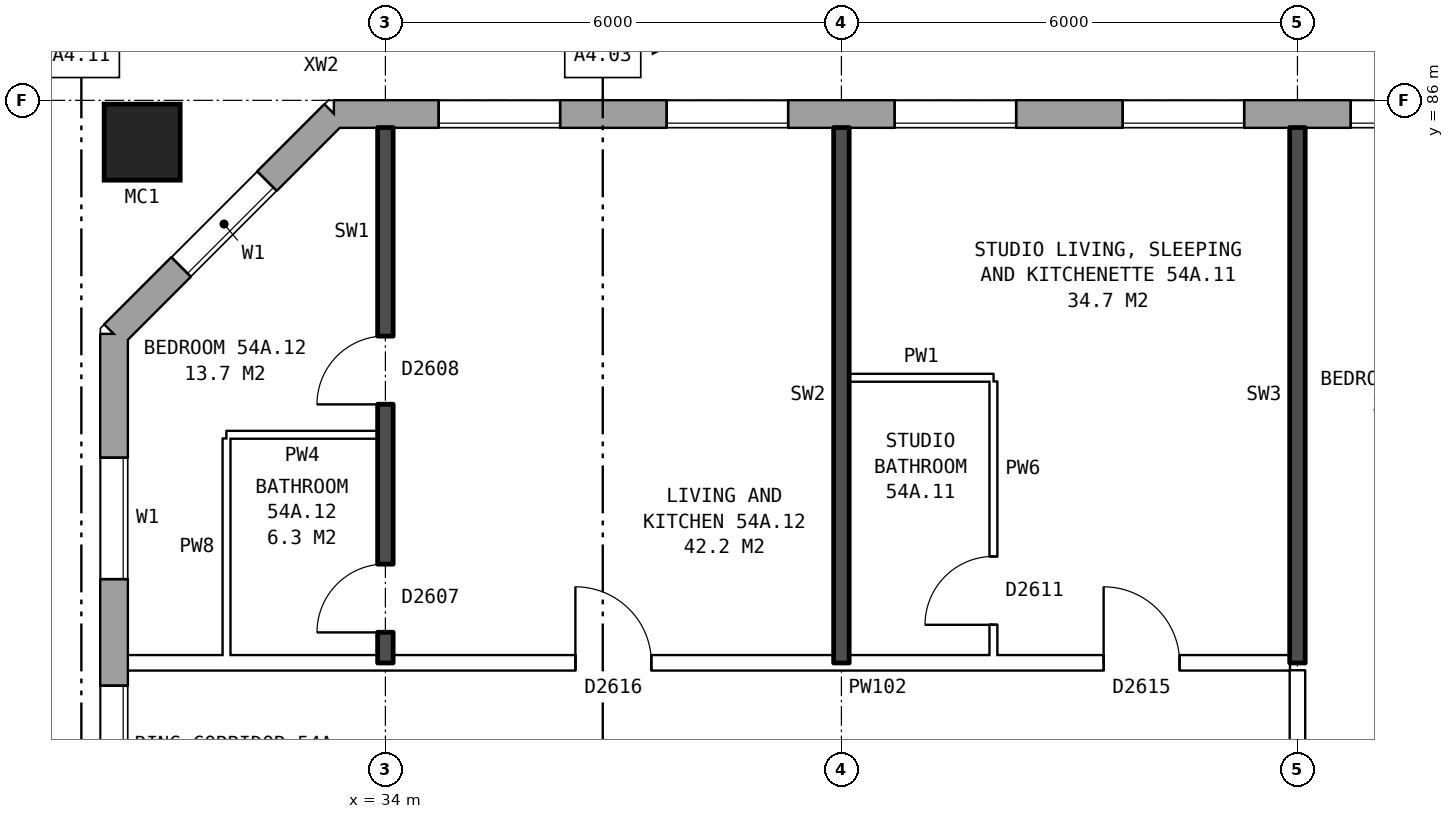
"""IFC4 building model, lengths in metres.
Left out: names, types, materials, properties, quantities, classifications, styles, units other than length and angle.
Written with IfcOpenShell. Run it as: python <this file> out.ifc"""

import sys

from ifc_helpers import new_model, si_unit, direction, frame, frame_2d, origin, origin_2d, place, context, subcontext, project, spatial, rectangle, hollow_rectangle, extrude, element, fill, save


model = new_model("IFC4")
c1 = context("Model", 3, precision=1e-05, world=origin(), true_north=direction((0.0, 1.0)))
c2 = subcontext(c1, "Body", "Model", "MODEL_VIEW")
j1 = project(units=[si_unit("LENGTHUNIT", "METRE"), si_unit("PLANEANGLEUNIT", "RADIAN")], contexts=[c1])
p1 = place(None, origin())
s1 = spatial("IfcSite", under=j1, at=p1, CompositionType="ELEMENT")
p2 = place(p1, origin())
s2 = spatial("IfcBuilding", under=s1, at=p2, CompositionType="ELEMENT")
p3 = place(p2, frame((0.0, 0.0, 191.3)))
s3 = spatial("IfcBuildingStorey", under=s2, at=p3, CompositionType="ELEMENT", Elevation=191.3)
p4 = place(p3, frame((30.8, 85.45, 0.0), z_axis=(0.0, 0.0, 1.0), x_axis=(1.0, 0.0, 0.0)))
e1 = element("IfcColumn", 1, at=p4, inside=s3, PredefinedType="COLUMN", context=c2, shape_type="SweptSolid", body=[
    extrude(hollow_rectangle(XDim=1.0, YDim=1.0, WallThickness=0.055, at=origin_2d()), origin(), (0.0, 0.0, 1.0), 3.1),
])
p5 = place(p3, frame((72.925, 85.82, 0.0), z_axis=(0.0, 0.0, 1.0), x_axis=(-1.0, 0.0, 0.0)))
e2 = element("IfcWall", 2, at=p5, inside=s3, PredefinedType="STANDARD", context=c2, shape_type="SweptSolid", body=[
    extrude(rectangle(XDim=39.601, YDim=0.36, at=frame_2d((19.8, 0.0))), origin(), (0.0, 0.0, 1.0), 2.85),
])
p6 = place(p5, frame((0.625, 0.0, 0.8)))
e3 = element("IfcOpeningElement", 3, at=p6, cuts=e2, PredefinedType="OPENING", context=c2, shape_type="SweptSolid", body=[
    extrude(rectangle(XDim=1.6, YDim=1.8, at=frame_2d((0.8, 0.9))), frame((0.0, 0.19, 0.0), z_axis=(0.0, -1.0, 0.0), x_axis=(1.0, 0.0, 0.0)), (0.0, 0.0, 1.0), 0.38),
])
p7 = place(p5, frame((3.625, 0.0, 0.8)))
e4 = element("IfcOpeningElement", 4, at=p7, cuts=e2, PredefinedType="OPENING", context=c2, shape_type="SweptSolid", body=[
    extrude(rectangle(XDim=1.6, YDim=1.8, at=frame_2d((0.8, 0.9))), frame((0.0, 0.19, 0.0), z_axis=(0.0, -1.0, 0.0), x_axis=(1.0, 0.0, 0.0)), (0.0, 0.0, 1.0), 0.38),
])
p8 = place(p5, frame((6.625, 0.0, 0.8)))
e5 = element("IfcOpeningElement", 5, at=p8, cuts=e2, PredefinedType="OPENING", context=c2, shape_type="SweptSolid", body=[
    extrude(rectangle(XDim=1.6, YDim=1.8, at=frame_2d((0.8, 0.9))), frame((0.0, 0.19, 0.0), z_axis=(0.0, -1.0, 0.0), x_axis=(1.0, 0.0, 0.0)), (0.0, 0.0, 1.0), 0.38),
])
p9 = place(p5, frame((9.625, 0.0, 0.8)))
e6 = element("IfcOpeningElement", 6, at=p9, cuts=e2, PredefinedType="OPENING", context=c2, shape_type="SweptSolid", body=[
    extrude(rectangle(XDim=1.6, YDim=1.8, at=frame_2d((0.8, 0.9))), frame((0.0, 0.19, 0.0), z_axis=(0.0, -1.0, 0.0), x_axis=(1.0, 0.0, 0.0)), (0.0, 0.0, 1.0), 0.38),
])
p10 = place(p5, frame((12.625, 0.0, 0.8)))
e7 = element("IfcOpeningElement", 7, at=p10, cuts=e2, PredefinedType="OPENING", context=c2, shape_type="SweptSolid", body=[
    extrude(rectangle(XDim=1.6, YDim=1.8, at=frame_2d((0.8, 0.9))), frame((0.0, 0.19, 0.0), z_axis=(0.0, -1.0, 0.0), x_axis=(1.0, 0.0, 0.0)), (0.0, 0.0, 1.0), 0.38),
])
p11 = place(p5, frame((15.625, 0.0, 0.8)))
e8 = element("IfcOpeningElement", 8, at=p11, cuts=e2, PredefinedType="OPENING", context=c2, shape_type="SweptSolid", body=[
    extrude(rectangle(XDim=1.6, YDim=1.8, at=frame_2d((0.8, 0.9))), frame((0.0, 0.19, 0.0), z_axis=(0.0, -1.0, 0.0), x_axis=(1.0, 0.0, 0.0)), (0.0, 0.0, 1.0), 0.38),
])
p12 = place(p5, frame((18.975, 0.0, 0.15)))
e9 = element("IfcOpeningElement", 9, at=p12, cuts=e2, PredefinedType="OPENING", context=c2, shape_type="SweptSolid", body=[
    extrude(rectangle(XDim=1.6, YDim=1.2, at=frame_2d((0.8, 0.6))), frame((0.0, 0.19, 0.0), z_axis=(0.0, -1.0, 0.0), x_axis=(1.0, 0.0, 0.0)), (0.0, 0.0, 1.0), 0.38),
])
p13 = place(p5, frame((21.375, 0.0, 1.7)))
e10 = element("IfcOpeningElement", 10, at=p13, cuts=e2, PredefinedType="OPENING", context=c2, shape_type="SweptSolid", body=[
    extrude(rectangle(XDim=0.6, YDim=0.9, at=frame_2d((0.3, 0.45))), frame((0.0, 0.19, 0.0), z_axis=(0.0, -1.0, 0.0), x_axis=(1.0, 0.0, 0.0)), (0.0, 0.0, 1.0), 0.38),
])
p14 = place(p5, frame((24.625, 0.0, 0.8)))
e11 = element("IfcOpeningElement", 11, at=p14, cuts=e2, PredefinedType="OPENING", context=c2, shape_type="SweptSolid", body=[
    extrude(rectangle(XDim=1.6, YDim=1.8, at=frame_2d((0.8, 0.9))), frame((0.0, 0.19, 0.0), z_axis=(0.0, -1.0, 0.0), x_axis=(1.0, 0.0, 0.0)), (0.0, 0.0, 1.0), 0.38),
])
p15 = place(p5, frame((27.625, 0.0, 0.8)))
e12 = element("IfcOpeningElement", 12, at=p15, cuts=e2, PredefinedType="OPENING", context=c2, shape_type="SweptSolid", body=[
    extrude(rectangle(XDim=1.6, YDim=1.8, at=frame_2d((0.8, 0.9))), frame((0.0, 0.19, 0.0), z_axis=(0.0, -1.0, 0.0), x_axis=(1.0, 0.0, 0.0)), (0.0, 0.0, 1.0), 0.38),
])
p16 = place(p5, frame((30.625, 0.0, 0.8)))
e13 = element("IfcOpeningElement", 13, at=p16, cuts=e2, PredefinedType="OPENING", context=c2, shape_type="SweptSolid", body=[
    extrude(rectangle(XDim=1.6, YDim=1.8, at=frame_2d((0.8, 0.9))), frame((0.0, 0.19, 0.0), z_axis=(0.0, -1.0, 0.0), x_axis=(1.0, 0.0, 0.0)), (0.0, 0.0, 1.0), 0.38),
])
p17 = place(p5, frame((33.625, 0.0, 0.8)))
e14 = element("IfcOpeningElement", 14, at=p17, cuts=e2, PredefinedType="OPENING", context=c2, shape_type="SweptSolid", body=[
    extrude(rectangle(XDim=1.6, YDim=1.8, at=frame_2d((0.8, 0.9))), frame((0.0, 0.19, 0.0), z_axis=(0.0, -1.0, 0.0), x_axis=(1.0, 0.0, 0.0)), (0.0, 0.0, 1.0), 0.38),
])
p18 = place(p5, frame((36.625, 0.0, 0.8)))
e15 = element("IfcOpeningElement", 15, at=p18, cuts=e2, PredefinedType="OPENING", context=c2, shape_type="SweptSolid", body=[
    extrude(rectangle(XDim=1.6, YDim=1.8, at=frame_2d((0.8, 0.9))), frame((0.0, 0.19, 0.0), z_axis=(0.0, -1.0, 0.0), x_axis=(1.0, 0.0, 0.0)), (0.0, 0.0, 1.0), 0.38),
])
p19 = place(p5, frame((22.275, 0.0, 0.8)))
e16 = element("IfcOpeningElement", 16, at=p19, cuts=e2, PredefinedType="OPENING", context=c2, shape_type="SweptSolid", body=[
    extrude(rectangle(XDim=1.4, YDim=1.8, at=frame_2d((0.7, 0.9))), frame((0.0, 0.19, 0.0), z_axis=(0.0, -1.0, 0.0), x_axis=(1.0, 0.0, 0.0)), (0.0, 0.0, 1.0), 0.38),
])
p20 = place(p3, frame((33.325, 85.82, 0.0), z_axis=(0.0, 0.0, 1.0), x_axis=(-0.707106781187, -0.707106781187, 0.0)))
e17 = element("IfcWall", 17, at=p20, inside=s3, PredefinedType="STANDARD", context=c2, shape_type="SweptSolid", body=[
    extrude(rectangle(XDim=4.094, YDim=0.36, at=frame_2d((2.047, 0.0))), origin(), (0.0, 0.0, 1.0), 2.85),
])
p21 = place(p20, frame((1.247, 0.0, 0.8)))
e18 = element("IfcOpeningElement", 18, at=p21, cuts=e17, PredefinedType="OPENING", context=c2, shape_type="SweptSolid", body=[
    extrude(rectangle(XDim=1.6, YDim=1.8, at=frame_2d((0.8, 0.9))), frame((0.0, 0.19, 0.0), z_axis=(0.0, -1.0, 0.0), x_axis=(1.0, 0.0, 0.0)), (0.0, 0.0, 1.0), 0.38),
])
p22 = place(p3, frame((30.43, 82.925, 0.0), z_axis=(0.0, 0.0, 1.0), x_axis=(0.0, -1.0, 0.0)))
e19 = element("IfcWall", 19, at=p22, inside=s3, PredefinedType="STANDARD", context=c2, shape_type="SweptSolid", body=[
    extrude(rectangle(XDim=25.851, YDim=0.36, at=frame_2d((12.925, 0.0))), origin(), (0.0, 0.0, 1.0), 2.85),
])
p23 = place(p22, frame((1.625, 0.0, 0.8)))
e20 = element("IfcOpeningElement", 20, at=p23, cuts=e19, PredefinedType="OPENING", context=c2, shape_type="SweptSolid", body=[
    extrude(rectangle(XDim=1.6, YDim=1.8, at=frame_2d((0.8, 0.9))), frame((0.0, 0.19, 0.0), z_axis=(0.0, -1.0, 0.0), x_axis=(1.0, 0.0, 0.0)), (0.0, 0.0, 1.0), 0.38),
])
p24 = place(p22, frame((4.625, 0.0, 0.8)))
e21 = element("IfcOpeningElement", 21, at=p24, cuts=e19, PredefinedType="OPENING", context=c2, shape_type="SweptSolid", body=[
    extrude(rectangle(XDim=1.6, YDim=1.8, at=frame_2d((0.8, 0.9))), frame((0.0, 0.19, 0.0), z_axis=(0.0, -1.0, 0.0), x_axis=(1.0, 0.0, 0.0)), (0.0, 0.0, 1.0), 0.38),
])
p25 = place(p22, frame((7.625, 0.0, 0.8)))
e22 = element("IfcOpeningElement", 22, at=p25, cuts=e19, PredefinedType="OPENING", context=c2, shape_type="SweptSolid", body=[
    extrude(rectangle(XDim=1.6, YDim=1.8, at=frame_2d((0.8, 0.9))), frame((0.0, 0.19, 0.0), z_axis=(0.0, -1.0, 0.0), x_axis=(1.0, 0.0, 0.0)), (0.0, 0.0, 1.0), 0.38),
])
p26 = place(p22, frame((10.625, 0.0, 0.8)))
e23 = element("IfcOpeningElement", 23, at=p26, cuts=e19, PredefinedType="OPENING", context=c2, shape_type="SweptSolid", body=[
    extrude(rectangle(XDim=1.6, YDim=1.8, at=frame_2d((0.8, 0.9))), frame((0.0, 0.19, 0.0), z_axis=(0.0, -1.0, 0.0), x_axis=(1.0, 0.0, 0.0)), (0.0, 0.0, 1.0), 0.38),
])
p27 = place(p22, frame((13.625, 0.0, 0.8)))
e24 = element("IfcOpeningElement", 24, at=p27, cuts=e19, PredefinedType="OPENING", context=c2, shape_type="SweptSolid", body=[
    extrude(rectangle(XDim=1.6, YDim=1.8, at=frame_2d((0.8, 0.9))), frame((0.0, 0.19, 0.0), z_axis=(0.0, -1.0, 0.0), x_axis=(1.0, 0.0, 0.0)), (0.0, 0.0, 1.0), 0.38),
])
p28 = place(p22, frame((16.625, 0.0, 0.8)))
e25 = element("IfcOpeningElement", 25, at=p28, cuts=e19, PredefinedType="OPENING", context=c2, shape_type="SweptSolid", body=[
    extrude(rectangle(XDim=1.6, YDim=1.8, at=frame_2d((0.8, 0.9))), frame((0.0, 0.19, 0.0), z_axis=(0.0, -1.0, 0.0), x_axis=(1.0, 0.0, 0.0)), (0.0, 0.0, 1.0), 0.38),
])
p29 = place(p22, frame((19.625, 0.0, 0.8)))
e26 = element("IfcOpeningElement", 26, at=p29, cuts=e19, PredefinedType="OPENING", context=c2, shape_type="SweptSolid", body=[
    extrude(rectangle(XDim=1.6, YDim=1.8, at=frame_2d((0.8, 0.9))), frame((0.0, 0.19, 0.0), z_axis=(0.0, -1.0, 0.0), x_axis=(1.0, 0.0, 0.0)), (0.0, 0.0, 1.0), 0.38),
])
p30 = place(p22, frame((22.625, 0.0, 0.8)))
e27 = element("IfcOpeningElement", 27, at=p30, cuts=e19, PredefinedType="OPENING", context=c2, shape_type="SweptSolid", body=[
    extrude(rectangle(XDim=1.6, YDim=1.8, at=frame_2d((0.8, 0.9))), frame((0.0, 0.19, 0.0), z_axis=(0.0, -1.0, 0.0), x_axis=(1.0, 0.0, 0.0)), (0.0, 0.0, 1.0), 0.38),
])
p31 = place(p3, frame((30.61, 78.6, 0.0), z_axis=(0.0, 0.0, 1.0), x_axis=(1.0, 0.0, 0.0)))
e28 = element("IfcWall", 28, at=p31, inside=s3, PredefinedType="PARTITIONING", context=c2, shape_type="SweptSolid", body=[
    extrude(rectangle(XDim=15.29, YDim=0.2, at=frame_2d((7.645, 0.0))), origin(), (0.0, 0.0, 1.0), 2.85),
])
p32 = place(p31, frame((12.84, 0.0, 0.0)))
e29 = element("IfcOpeningElement", 29, at=p32, cuts=e28, PredefinedType="OPENING", context=c2, shape_type="SweptSolid", body=[
    extrude(rectangle(XDim=1.0, YDim=2.1, at=frame_2d((0.5, 1.05))), frame((0.0, 0.11, 0.0), z_axis=(0.0, -1.0, 0.0), x_axis=(1.0, 0.0, 0.0)), (0.0, 0.0, 1.0), 0.22),
])
p33 = place(p31, frame((5.89, 0.0, 0.0)))
e30 = element("IfcOpeningElement", 30, at=p33, cuts=e28, PredefinedType="OPENING", context=c2, shape_type="SweptSolid", body=[
    extrude(rectangle(XDim=1.0, YDim=2.1, at=frame_2d((0.5, 1.05))), frame((0.0, 0.11, 0.0), z_axis=(0.0, -1.0, 0.0), x_axis=(1.0, 0.0, 0.0)), (0.0, 0.0, 1.0), 0.22),
])
p34 = place(p3, frame((31.91, 81.6, 0.0), z_axis=(0.0, 0.0, 1.0), x_axis=(1.0, 0.0, 0.0)))
e31 = element("IfcWall", 31, at=p34, inside=s3, PredefinedType="PARTITIONING", context=c2, shape_type="SweptSolid", body=[
    extrude(rectangle(XDim=1.99, YDim=0.1, at=frame_2d((0.995, 0.0))), origin(), (0.0, 0.0, 1.0), 2.85),
])
p35 = place(p3, frame((40.1, 82.35, 0.0), z_axis=(0.0, 0.0, 1.0), x_axis=(1.0, 0.0, 0.0)))
e32 = element("IfcWall", 32, at=p35, inside=s3, PredefinedType="PARTITIONING", context=c2, shape_type="SweptSolid", body=[
    extrude(rectangle(XDim=1.9, YDim=0.1, at=frame_2d((0.95, 0.0))), origin(), (0.0, 0.0, 1.0), 2.85),
])
p36 = place(p3, frame((31.91, 78.7, 0.0), z_axis=(0.0, 0.0, 1.0), x_axis=(0.0, 1.0, 0.0)))
e33 = element("IfcWall", 33, at=p36, inside=s3, PredefinedType="PARTITIONING", context=c2, shape_type="SweptSolid", body=[
    extrude(rectangle(XDim=2.85, YDim=0.1, at=frame_2d((1.425, 0.0))), origin(), (0.0, 0.0, 1.0), 2.85),
])
p37 = place(p3, frame((34.0, 78.6, 0.0), z_axis=(0.0, 0.0, 1.0), x_axis=(0.0, 1.0, 0.0)))
e34 = element("IfcWall", 34, at=p37, inside=s3, PredefinedType="SOLIDWALL", context=c2, shape_type="SweptSolid", body=[
    extrude(rectangle(XDim=7.04, YDim=0.2, at=frame_2d((3.52, 0.0))), origin(), (0.0, 0.0, 1.0), 2.85),
])
p38 = place(p37, frame((3.4, 0.0, 0.0)))
e35 = element("IfcOpeningElement", 35, at=p38, cuts=e34, PredefinedType="OPENING", context=c2, shape_type="SweptSolid", body=[
    extrude(rectangle(XDim=0.9, YDim=2.1, at=frame_2d((0.45, 1.05))), frame((0.0, 0.11, 0.0), z_axis=(0.0, -1.0, 0.0), x_axis=(1.0, 0.0, 0.0)), (0.0, 0.0, 1.0), 0.22),
])
p39 = place(p37, frame((0.4, 0.0, 0.0)))
e36 = element("IfcOpeningElement", 36, at=p39, cuts=e34, PredefinedType="OPENING", context=c2, shape_type="SweptSolid", body=[
    extrude(rectangle(XDim=0.9, YDim=2.1, at=frame_2d((0.45, 1.05))), frame((0.0, 0.11, 0.0), z_axis=(0.0, -1.0, 0.0), x_axis=(1.0, 0.0, 0.0)), (0.0, 0.0, 1.0), 0.22),
])
p40 = place(p3, frame((40.0, 78.6, 0.0), z_axis=(0.0, 0.0, 1.0), x_axis=(0.0, 1.0, 0.0)))
e37 = element("IfcWall", 37, at=p40, inside=s3, PredefinedType="SOLIDWALL", context=c2, shape_type="SweptSolid", body=[
    extrude(rectangle(XDim=7.04, YDim=0.2, at=frame_2d((3.52, 0.0))), origin(), (0.0, 0.0, 1.0), 2.85),
])
p41 = place(p3, frame((42.0, 78.7, 0.0), z_axis=(0.0, 0.0, 1.0), x_axis=(0.0, 1.0, 0.0)))
e38 = element("IfcWall", 38, at=p41, inside=s3, PredefinedType="PARTITIONING", context=c2, shape_type="SweptSolid", body=[
    extrude(rectangle(XDim=3.6, YDim=0.1, at=frame_2d((1.8, 0.0))), origin(), (0.0, 0.0, 1.0), 2.85),
])
p42 = place(p41, frame((0.4, 0.0, 0.0)))
e39 = element("IfcOpeningElement", 39, at=p42, cuts=e38, PredefinedType="OPENING", context=c2, shape_type="SweptSolid", body=[
    extrude(rectangle(XDim=0.9, YDim=2.1, at=frame_2d((0.45, 1.05))), frame((0.0, 0.06, 0.0), z_axis=(0.0, -1.0, 0.0), x_axis=(1.0, 0.0, 0.0)), (0.0, 0.0, 1.0), 0.12),
])
p43 = place(p3, frame((46.0, 76.3, 0.0), z_axis=(0.0, 0.0, 1.0), x_axis=(0.0, 1.0, 0.0)))
e40 = element("IfcWall", 40, at=p43, inside=s3, PredefinedType="PARTITIONING", context=c2, shape_type="SweptSolid", body=[
    extrude(rectangle(XDim=2.2, YDim=0.2, at=frame_2d((1.1, 0.0))), origin(), (0.0, 0.0, 1.0), 2.85),
])
p44 = place(p3, frame((46.0, 78.6, 0.0), z_axis=(0.0, 0.0, 1.0), x_axis=(0.0, 1.0, 0.0)))
e41 = element("IfcWall", 41, at=p44, inside=s3, PredefinedType="SOLIDWALL", context=c2, shape_type="SweptSolid", body=[
    extrude(rectangle(XDim=7.04, YDim=0.2, at=frame_2d((3.52, 0.0))), origin(), (0.0, 0.0, 1.0), 2.85),
])
p45 = place(p14, origin())
e42 = element("IfcWindow", 42, at=p45, inside=s3, PartitioningType="SINGLE_PANEL", PredefinedType="WINDOW", context=c2, shape_type="SweptSolid", body=[
    extrude(rectangle(XDim=1.6, YDim=1.8, at=frame_2d((0.8, 0.9))), frame((0.0, 0.15, 0.0), z_axis=(0.0, -1.0, 0.0), x_axis=(1.0, 0.0, 0.0)), (0.0, 0.0, 1.0), 0.06),
])
fill(e11, e42)
p46 = place(p15, origin())
e43 = element("IfcWindow", 43, at=p46, inside=s3, PartitioningType="SINGLE_PANEL", PredefinedType="WINDOW", context=c2, shape_type="SweptSolid", body=[
    extrude(rectangle(XDim=1.6, YDim=1.8, at=frame_2d((0.8, 0.9))), frame((0.0, 0.15, 0.0), z_axis=(0.0, -1.0, 0.0), x_axis=(1.0, 0.0, 0.0)), (0.0, 0.0, 1.0), 0.06),
])
fill(e12, e43)
p47 = place(p16, origin())
e44 = element("IfcWindow", 44, at=p47, inside=s3, PartitioningType="SINGLE_PANEL", PredefinedType="WINDOW", context=c2, shape_type="SweptSolid", body=[
    extrude(rectangle(XDim=1.6, YDim=1.8, at=frame_2d((0.8, 0.9))), frame((0.0, 0.15, 0.0), z_axis=(0.0, -1.0, 0.0), x_axis=(1.0, 0.0, 0.0)), (0.0, 0.0, 1.0), 0.06),
])
fill(e13, e44)
p48 = place(p17, origin())
e45 = element("IfcWindow", 45, at=p48, inside=s3, PartitioningType="SINGLE_PANEL", PredefinedType="WINDOW", context=c2, shape_type="SweptSolid", body=[
    extrude(rectangle(XDim=1.6, YDim=1.8, at=frame_2d((0.8, 0.9))), frame((0.0, 0.15, 0.0), z_axis=(0.0, -1.0, 0.0), x_axis=(1.0, 0.0, 0.0)), (0.0, 0.0, 1.0), 0.06),
])
fill(e14, e45)
p49 = place(p18, origin())
e46 = element("IfcWindow", 46, at=p49, inside=s3, PartitioningType="SINGLE_PANEL", PredefinedType="WINDOW", context=c2, shape_type="SweptSolid", body=[
    extrude(rectangle(XDim=1.6, YDim=1.8, at=frame_2d((0.8, 0.9))), frame((0.0, 0.15, 0.0), z_axis=(0.0, -1.0, 0.0), x_axis=(1.0, 0.0, 0.0)), (0.0, 0.0, 1.0), 0.06),
])
fill(e15, e46)
p50 = place(p21, origin())
e47 = element("IfcWindow", 47, at=p50, inside=s3, PartitioningType="SINGLE_PANEL", PredefinedType="WINDOW", context=c2, shape_type="SweptSolid", body=[
    extrude(rectangle(XDim=1.6, YDim=1.8, at=frame_2d((0.8, 0.9))), frame((0.0, 0.15, 0.0), z_axis=(0.0, -1.0, 0.0), x_axis=(1.0, 0.0, 0.0)), (0.0, 0.0, 1.0), 0.06),
])
fill(e18, e47)
p51 = place(p23, origin())
e48 = element("IfcWindow", 48, at=p51, inside=s3, PartitioningType="SINGLE_PANEL", PredefinedType="WINDOW", context=c2, shape_type="SweptSolid", body=[
    extrude(rectangle(XDim=1.6, YDim=1.8, at=frame_2d((0.8, 0.9))), frame((0.0, 0.15, 0.0), z_axis=(0.0, -1.0, 0.0), x_axis=(1.0, 0.0, 0.0)), (0.0, 0.0, 1.0), 0.06),
])
fill(e20, e48)
p52 = place(p24, origin())
e49 = element("IfcWindow", 49, at=p52, inside=s3, PartitioningType="SINGLE_PANEL", PredefinedType="WINDOW", context=c2, shape_type="SweptSolid", body=[
    extrude(rectangle(XDim=1.6, YDim=1.8, at=frame_2d((0.8, 0.9))), frame((0.0, 0.15, 0.0), z_axis=(0.0, -1.0, 0.0), x_axis=(1.0, 0.0, 0.0)), (0.0, 0.0, 1.0), 0.06),
])
fill(e21, e49)
p53 = place(p32, origin())
e50 = element("IfcDoor", 50, at=p53, inside=s3, OperationType="SINGLE_SWING_LEFT", PredefinedType="DOOR", context=c2, shape_type="SweptSolid", body=[
    extrude(rectangle(XDim=1.0, YDim=2.1, at=frame_2d((0.5, 1.05))), frame((0.0, 0.025, 0.0), z_axis=(0.0, -1.0, 0.0), x_axis=(1.0, 0.0, 0.0)), (0.0, 0.0, 1.0), 0.05),
])
fill(e29, e50)
p54 = place(p42, origin())
e51 = element("IfcDoor", 51, at=p54, inside=s3, OperationType="SINGLE_SWING_LEFT", PredefinedType="DOOR", context=c2, shape_type="SweptSolid", body=[
    extrude(rectangle(XDim=0.9, YDim=2.1, at=frame_2d((0.45, 1.05))), frame((0.0, 0.025, 0.0), z_axis=(0.0, -1.0, 0.0), x_axis=(1.0, 0.0, 0.0)), (0.0, 0.0, 1.0), 0.05),
])
fill(e39, e51)
p55 = place(p38, origin())
e52 = element("IfcDoor", 52, at=p55, inside=s3, OperationType="SINGLE_SWING_LEFT", PredefinedType="DOOR", context=c2, shape_type="SweptSolid", body=[
    extrude(rectangle(XDim=0.9, YDim=2.1, at=frame_2d((0.45, 1.05))), frame((0.0, 0.025, 0.0), z_axis=(0.0, -1.0, 0.0), x_axis=(1.0, 0.0, 0.0)), (0.0, 0.0, 1.0), 0.05),
])
fill(e35, e52)
p56 = place(p33, origin())
e53 = element("IfcDoor", 53, at=p56, inside=s3, OperationType="SINGLE_SWING_LEFT", PredefinedType="DOOR", context=c2, shape_type="SweptSolid", body=[
    extrude(rectangle(XDim=1.0, YDim=2.1, at=frame_2d((0.5, 1.05))), frame((0.0, 0.025, 0.0), z_axis=(0.0, -1.0, 0.0), x_axis=(1.0, 0.0, 0.0)), (0.0, 0.0, 1.0), 0.05),
])
fill(e30, e53)
p57 = place(p39, origin())
e54 = element("IfcDoor", 54, at=p57, inside=s3, OperationType="SINGLE_SWING_LEFT", PredefinedType="DOOR", context=c2, shape_type="SweptSolid", body=[
    extrude(rectangle(XDim=0.9, YDim=2.1, at=frame_2d((0.45, 1.05))), frame((0.0, 0.025, 0.0), z_axis=(0.0, -1.0, 0.0), x_axis=(1.0, 0.0, 0.0)), (0.0, 0.0, 1.0), 0.05),
])
fill(e36, e54)
save(model, sys.argv[1])
